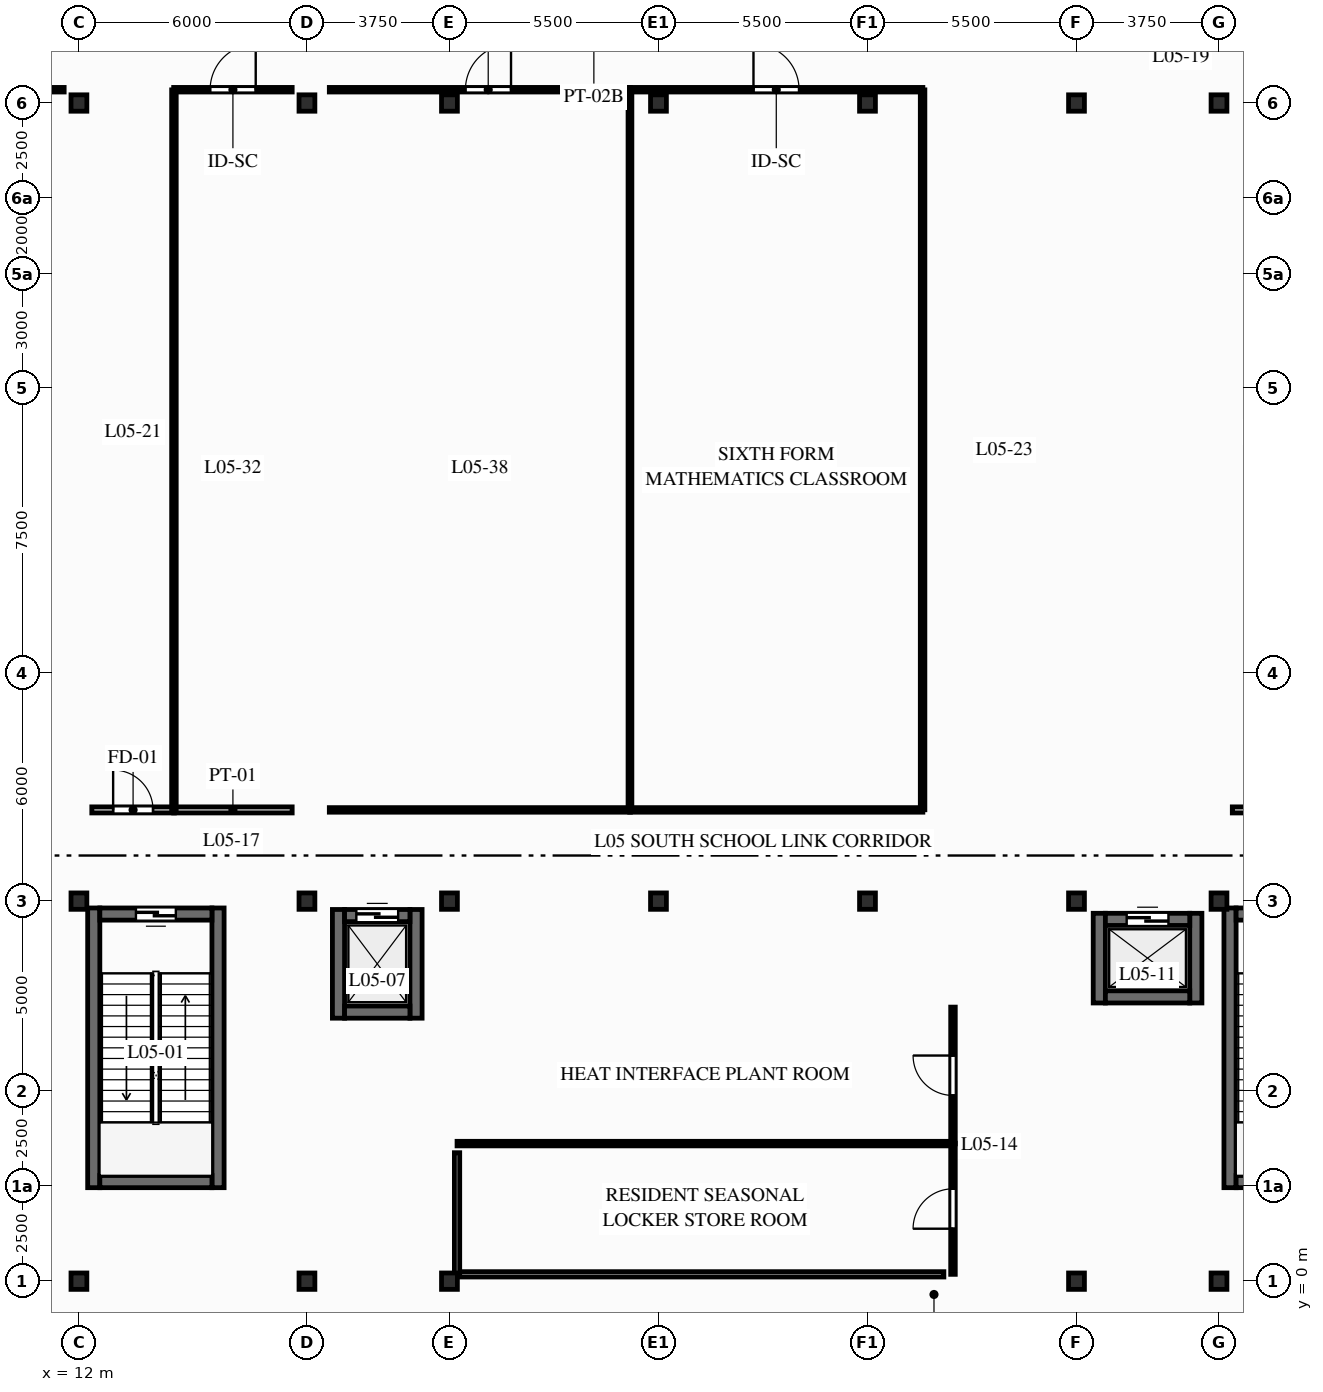
"""IFC4 building model, lengths in metres.
Left out: names, types, materials, properties, quantities, classifications, styles, units other than length and angle.
Written with IfcOpenShell. Run it as: python <this file> out.ifc"""

import sys

from ifc_helpers import new_model, si_unit, direction, frame, frame_2d, origin, origin_2d, place, context, subcontext, project, spatial, rectangle, i_section, extrude, element, fill, save


model = new_model("IFC4")
c1 = context("Model", 3, precision=1e-05, world=origin(), true_north=direction((0.0, 1.0)))
c2 = subcontext(c1, "Body", "Model", "MODEL_VIEW")
j1 = project(units=[si_unit("LENGTHUNIT", "METRE"), si_unit("PLANEANGLEUNIT", "RADIAN")], contexts=[c1])
p1 = place(None, origin())
s1 = spatial("IfcSite", under=j1, at=p1, CompositionType="ELEMENT")
p2 = place(p1, origin())
s2 = spatial("IfcBuilding", under=s1, at=p2, CompositionType="ELEMENT")
p3 = place(p2, frame((0.0, 0.0, 22.5)))
s3 = spatial("IfcBuildingStorey", under=s2, at=p3, CompositionType="ELEMENT", Elevation=22.5)
for number, where, z_axis, x_axis in (
    (1, (12.0, 0.0, 0.0), (0.0, 0.0, 1.0), (1.0, 0.0, 0.0)),
    (2, (12.0, 10.0, 0.0), (0.0, 0.0, 1.0), (1.0, 0.0, 0.0)),
    (3, (12.0, 31.0, 0.0), (0.0, 0.0, 1.0), (1.0, 0.0, 0.0)),
    (4, (18.0, 0.0, 0.0), (0.0, 0.0, 1.0), (1.0, 0.0, 0.0)),
    (5, (18.0, 10.0, 0.0), (0.0, 0.0, 1.0), (1.0, 0.0, 0.0)),
    (6, (18.0, 31.0, 0.0), (0.0, 0.0, 1.0), (1.0, 0.0, 0.0)),
    (7, (21.75, 0.0, 0.0), (0.0, 0.0, 1.0), (1.0, 0.0, 0.0)),
    (8, (21.75, 10.0, 0.0), (0.0, 0.0, 1.0), (1.0, 0.0, 0.0)),
    (9, (21.75, 31.0, 0.0), (0.0, 0.0, 1.0), (1.0, 0.0, 0.0)),
    (10, (27.25, 10.0, 0.0), (0.0, 0.0, 1.0), (1.0, 0.0, 0.0)),
    (11, (27.25, 31.0, 0.0), (0.0, 0.0, 1.0), (1.0, 0.0, 0.0)),
    (12, (32.75, 10.0, 0.0), (0.0, 0.0, 1.0), (1.0, 0.0, 0.0)),
    (13, (32.75, 31.0, 0.0), (0.0, 0.0, 1.0), (1.0, 0.0, 0.0)),
    (14, (38.25, 0.0, 0.0), (0.0, 0.0, 1.0), (1.0, 0.0, 0.0)),
    (15, (38.25, 10.0, 0.0), (0.0, 0.0, 1.0), (1.0, 0.0, 0.0)),
    (16, (38.25, 31.0, 0.0), (0.0, 0.0, 1.0), (1.0, 0.0, 0.0)),
    (17, (42.0, 0.0, 0.0), (0.0, 0.0, 1.0), (1.0, 0.0, 0.0)),
    (18, (42.0, 10.0, 0.0), (0.0, 0.0, 1.0), (1.0, 0.0, 0.0)),
    (19, (42.0, 31.0, 0.0), (0.0, 0.0, 1.0), (1.0, 0.0, 0.0)),
):
    element("IfcColumn", number, at=place(p3, frame(where, z_axis=z_axis, x_axis=x_axis)), inside=s3, PredefinedType="COLUMN", context=c2, shape_type="SweptSolid", body=[
        extrude(i_section(OverallWidth=0.417, OverallDepth=0.431, WebThickness=0.065, FlangeThickness=0.106, FilletRadius=0.015, at=origin_2d()), origin(), (0.0, 0.0, 1.0), 5.5),
    ])
for number, where, z_axis, x_axis in (
    (20, (12.39, 2.46, 0.0), (0.0, 0.0, 1.0), (0.0, 1.0, 0.0)),
    (21, (15.66, 2.46, 0.0), (0.0, 0.0, 1.0), (0.0, 1.0, 0.0)),
):
    element("IfcWall", number, at=place(p3, frame(where, z_axis=z_axis, x_axis=x_axis)), inside=s3, PredefinedType="SHEAR", context=c2, shape_type="SweptSolid", body=[
        extrude(rectangle(XDim=7.36, YDim=0.32, at=frame_2d((3.68, 0.0))), origin(), (0.0, 0.0, 1.0), 5.23),
    ])
p4 = place(p3, frame((12.55, 2.62, 0.0), z_axis=(0.0, 0.0, 1.0), x_axis=(1.0, 0.0, 0.0)))
e22 = element("IfcWall", 22, at=p4, inside=s3, PredefinedType="SHEAR", context=c2, shape_type="SweptSolid", body=[
    extrude(rectangle(XDim=2.95, YDim=0.32, at=frame_2d((1.475, 0.0))), origin(), (0.0, 0.0, 1.0), 5.23),
])
p5 = place(p3, frame((15.5, 9.66, 0.0), z_axis=(0.0, 0.0, 1.0), x_axis=(-1.0, 0.0, 0.0)))
e23 = element("IfcWall", 23, at=p5, inside=s3, PredefinedType="SHEAR", context=c2, shape_type="SweptSolid", body=[
    extrude(rectangle(XDim=2.95, YDim=0.32, at=frame_2d((1.475, 0.0))), origin(), (0.0, 0.0, 1.0), 5.23),
])
p6 = place(p5, frame((0.95, 0.0, 0.0)))
e24 = element("IfcOpeningElement", 24, at=p6, cuts=e23, PredefinedType="OPENING", context=c2, shape_type="SweptSolid", body=[
    extrude(rectangle(XDim=1.05, YDim=2.06, at=frame_2d((0.525, 1.03))), frame((0.0, 0.17, 0.0), z_axis=(0.0, -1.0, 0.0), x_axis=(1.0, 0.0, 0.0)), (0.0, 0.0, 1.0), 0.34),
])
p7 = place(p3, frame((42.29, 2.46, 0.0), z_axis=(0.0, 0.0, 1.0), x_axis=(0.0, 1.0, 0.0)))
e25 = element("IfcWall", 25, at=p7, inside=s3, PredefinedType="SHEAR", context=c2, shape_type="SweptSolid", body=[
    extrude(rectangle(XDim=7.36, YDim=0.32, at=frame_2d((3.68, 0.0))), origin(), (0.0, 0.0, 1.0), 5.23),
])
p8 = place(p3, frame((42.45, 2.62, 0.0), z_axis=(0.0, 0.0, 1.0), x_axis=(1.0, 0.0, 0.0)))
e26 = element("IfcWall", 26, at=p8, inside=s3, PredefinedType="SHEAR", context=c2, shape_type="SweptSolid", body=[
    extrude(rectangle(XDim=2.95, YDim=0.32, at=frame_2d((1.475, 0.0))), origin(), (0.0, 0.0, 1.0), 5.23),
])
p9 = place(p3, frame((45.4, 9.66, 0.0), z_axis=(0.0, 0.0, 1.0), x_axis=(-1.0, 0.0, 0.0)))
e27 = element("IfcWall", 27, at=p9, inside=s3, PredefinedType="SHEAR", context=c2, shape_type="SweptSolid", body=[
    extrude(rectangle(XDim=2.95, YDim=0.32, at=frame_2d((1.475, 0.0))), origin(), (0.0, 0.0, 1.0), 5.23),
])
p10 = place(p9, frame((0.95, 0.0, 0.0)))
e28 = element("IfcOpeningElement", 28, at=p10, cuts=e27, PredefinedType="OPENING", context=c2, shape_type="SweptSolid", body=[
    extrude(rectangle(XDim=1.05, YDim=2.06, at=frame_2d((0.525, 1.03))), frame((0.0, 0.17, 0.0), z_axis=(0.0, -1.0, 0.0), x_axis=(1.0, 0.0, 0.0)), (0.0, 0.0, 1.0), 0.34),
])
for number, where, z_axis, x_axis in (
    (29, (18.83, 6.92, 0.0), (0.0, 0.0, 1.0), (0.0, 1.0, 0.0)),
    (30, (20.87, 6.92, 0.0), (0.0, 0.0, 1.0), (0.0, 1.0, 0.0)),
):
    element("IfcWall", number, at=place(p3, frame(where, z_axis=z_axis, x_axis=x_axis)), inside=s3, PredefinedType="SHEAR", context=c2, shape_type="SweptSolid", body=[
        extrude(rectangle(XDim=2.86, YDim=0.32, at=frame_2d((1.43, 0.0))), origin(), (0.0, 0.0, 1.0), 5.23),
    ])
p11 = place(p3, frame((18.99, 7.08, 0.0), z_axis=(0.0, 0.0, 1.0), x_axis=(1.0, 0.0, 0.0)))
e31 = element("IfcWall", 31, at=p11, inside=s3, PredefinedType="SHEAR", context=c2, shape_type="SweptSolid", body=[
    extrude(rectangle(XDim=1.72, YDim=0.32, at=frame_2d((0.86, 0.0))), origin(), (0.0, 0.0, 1.0), 5.23),
])
p12 = place(p3, frame((18.99, 9.62, 0.0), z_axis=(0.0, 0.0, 1.0), x_axis=(1.0, 0.0, 0.0)))
e32 = element("IfcWall", 32, at=p12, inside=s3, PredefinedType="SHEAR", context=c2, shape_type="SweptSolid", body=[
    extrude(rectangle(XDim=1.72, YDim=0.32, at=frame_2d((0.86, 0.0))), origin(), (0.0, 0.0, 1.0), 5.23),
])
p13 = place(p12, frame((0.31, 0.0, 0.0)))
e33 = element("IfcOpeningElement", 33, at=p13, cuts=e32, PredefinedType="OPENING", context=c2, shape_type="SweptSolid", body=[
    extrude(rectangle(XDim=1.1, YDim=2.06, at=frame_2d((0.55, 1.03))), frame((0.0, 0.17, 0.0), z_axis=(0.0, -1.0, 0.0), x_axis=(1.0, 0.0, 0.0)), (0.0, 0.0, 1.0), 0.34),
])
for number, where, z_axis, x_axis in (
    (34, (38.85, 7.32, 0.0), (0.0, 0.0, 1.0), (0.0, 1.0, 0.0)),
    (35, (41.39, 7.32, 0.0), (0.0, 0.0, 1.0), (0.0, 1.0, 0.0)),
):
    element("IfcWall", number, at=place(p3, frame(where, z_axis=z_axis, x_axis=x_axis)), inside=s3, PredefinedType="SHEAR", context=c2, shape_type="SweptSolid", body=[
        extrude(rectangle(XDim=2.36, YDim=0.32, at=frame_2d((1.18, 0.0))), origin(), (0.0, 0.0, 1.0), 5.23),
    ])
p14 = place(p3, frame((39.01, 7.48, 0.0), z_axis=(0.0, 0.0, 1.0), x_axis=(1.0, 0.0, 0.0)))
e36 = element("IfcWall", 36, at=p14, inside=s3, PredefinedType="SHEAR", context=c2, shape_type="SweptSolid", body=[
    extrude(rectangle(XDim=2.22, YDim=0.32, at=frame_2d((1.11, 0.0))), origin(), (0.0, 0.0, 1.0), 5.23),
])
p15 = place(p3, frame((39.01, 9.52, 0.0), z_axis=(0.0, 0.0, 1.0), x_axis=(1.0, 0.0, 0.0)))
e37 = element("IfcWall", 37, at=p15, inside=s3, PredefinedType="SHEAR", context=c2, shape_type="SweptSolid", body=[
    extrude(rectangle(XDim=2.22, YDim=0.32, at=frame_2d((1.11, 0.0))), origin(), (0.0, 0.0, 1.0), 5.23),
])
p16 = place(p15, frame((0.56, 0.0, 0.0)))
e38 = element("IfcOpeningElement", 38, at=p16, cuts=e37, PredefinedType="OPENING", context=c2, shape_type="SweptSolid", body=[
    extrude(rectangle(XDim=1.1, YDim=2.06, at=frame_2d((0.55, 1.03))), frame((0.0, 0.17, 0.0), z_axis=(0.0, -1.0, 0.0), x_axis=(1.0, 0.0, 0.0)), (0.0, 0.0, 1.0), 0.34),
])
p17 = place(p3, frame((35.0, 0.18, 0.0), z_axis=(0.0, 0.0, 1.0), x_axis=(0.0, 1.0, 0.0)))
e39 = element("IfcWall", 39, at=p17, inside=s3, PredefinedType="PARTITIONING", context=c2, shape_type="SweptSolid", body=[
    extrude(rectangle(XDim=3.451, YDim=0.12, at=frame_2d((1.726, 0.0))), origin(), (0.0, 0.0, 1.0), 5.23),
])
p18 = place(p17, frame((1.201, 0.0, 0.0)))
e40 = element("IfcOpeningElement", 40, at=p18, cuts=e39, PredefinedType="OPENING", context=c2, shape_type="SweptSolid", body=[
    extrude(rectangle(XDim=1.05, YDim=2.06, at=frame_2d((0.525, 1.03))), frame((0.0, 0.07, 0.0), z_axis=(0.0, -1.0, 0.0), x_axis=(1.0, 0.0, 0.0)), (0.0, 0.0, 1.0), 0.14),
])
p19 = place(p3, frame((35.0, 3.613, 0.0), z_axis=(0.0, 0.0, 1.0), x_axis=(0.0, 1.0, 0.0)))
e41 = element("IfcWall", 41, at=p19, inside=s3, PredefinedType="PARTITIONING", context=c2, shape_type="SweptSolid", body=[
    extrude(rectangle(XDim=3.598, YDim=0.12, at=frame_2d((1.799, 0.0))), origin(), (0.0, 0.0, 1.0), 5.23),
])
p20 = place(p19, frame((1.274, 0.0, 0.0)))
e42 = element("IfcOpeningElement", 42, at=p20, cuts=e41, PredefinedType="OPENING", context=c2, shape_type="SweptSolid", body=[
    extrude(rectangle(XDim=1.05, YDim=2.06, at=frame_2d((0.525, 1.03))), frame((0.0, 0.07, 0.0), z_axis=(0.0, -1.0, 0.0), x_axis=(1.0, 0.0, 0.0)), (0.0, 0.0, 1.0), 0.14),
])
p21 = place(p3, frame((21.95, 3.62, 0.0), z_axis=(0.0, 0.0, 1.0), x_axis=(1.0, 0.0, 0.0)))
e43 = element("IfcWall", 43, at=p21, inside=s3, PredefinedType="PARTITIONING", context=c2, shape_type="SweptSolid", body=[
    extrude(rectangle(XDim=13.046, YDim=0.12, at=frame_2d((6.523, 0.0))), origin(), (0.0, 0.0, 1.0), 5.23),
])
p22 = place(p3, frame((12.339, 12.4, 0.0), z_axis=(0.0, 0.0, 1.0), x_axis=(1.0, 0.0, 0.0)))
e44 = element("IfcWall", 44, at=p22, inside=s3, PredefinedType="PARTITIONING", context=c2, shape_type="SweptSolid", body=[
    extrude(rectangle(XDim=2.173, YDim=0.16, at=frame_2d((1.086, 0.0))), origin(), (0.0, 0.0, 1.0), 5.23),
])
p23 = place(p22, frame((0.561, 0.0, 0.0)))
e45 = element("IfcOpeningElement", 45, at=p23, cuts=e44, PredefinedType="OPENING", context=c2, shape_type="SweptSolid", body=[
    extrude(rectangle(XDim=1.05, YDim=2.06, at=frame_2d((0.525, 1.03))), frame((0.0, 0.09, 0.0), z_axis=(0.0, -1.0, 0.0), x_axis=(1.0, 0.0, 0.0)), (0.0, 0.0, 1.0), 0.18),
])
p24 = place(p3, frame((14.493, 12.4, 0.0), z_axis=(0.0, 0.0, 1.0), x_axis=(1.0, 0.0, 0.0)))
e46 = element("IfcWall", 46, at=p24, inside=s3, PredefinedType="PARTITIONING", context=c2, shape_type="SweptSolid", body=[
    extrude(rectangle(XDim=3.119, YDim=0.16, at=frame_2d((1.559, 0.0))), origin(), (0.0, 0.0, 1.0), 5.23),
])
p25 = place(p3, frame((42.35, 12.4, 0.0), z_axis=(0.0, 0.0, 1.0), x_axis=(1.0, 0.0, 0.0)))
e47 = element("IfcWall", 47, at=p25, inside=s3, PredefinedType="PARTITIONING", context=c2, shape_type="SweptSolid", body=[
    extrude(rectangle(XDim=2.161, YDim=0.16, at=frame_2d((1.081, 0.0))), origin(), (0.0, 0.0, 1.0), 5.23),
])
p26 = place(p25, frame((0.556, 0.0, 0.0)))
e48 = element("IfcOpeningElement", 48, at=p26, cuts=e47, PredefinedType="OPENING", context=c2, shape_type="SweptSolid", body=[
    extrude(rectangle(XDim=1.05, YDim=2.06, at=frame_2d((0.525, 1.03))), frame((0.0, 0.09, 0.0), z_axis=(0.0, -1.0, 0.0), x_axis=(1.0, 0.0, 0.0)), (0.0, 0.0, 1.0), 0.18),
])
p27 = place(p3, frame((6.389, 31.35, 0.0), z_axis=(0.0, 0.0, 1.0), x_axis=(1.0, 0.0, 0.0)))
e49 = element("IfcWall", 49, at=p27, inside=s3, PredefinedType="PARTITIONING", context=c2, shape_type="SweptSolid", body=[
    extrude(rectangle(XDim=5.223, YDim=0.12, at=frame_2d((2.611, 0.0))), origin(), (0.0, 0.0, 1.0), 5.23),
])
p28 = place(p27, frame((2.011, 0.0, 0.0)))
e50 = element("IfcOpeningElement", 50, at=p28, cuts=e49, PredefinedType="OPENING", context=c2, shape_type="SweptSolid", body=[
    extrude(rectangle(XDim=1.2, YDim=2.08, at=frame_2d((0.6, 1.04))), frame((0.0, 0.07, 0.0), z_axis=(0.0, -1.0, 0.0), x_axis=(1.0, 0.0, 0.0)), (0.0, 0.0, 1.0), 0.14),
])
p29 = place(p3, frame((14.493, 31.35, 0.0), z_axis=(0.0, 0.0, 1.0), x_axis=(1.0, 0.0, 0.0)))
e51 = element("IfcWall", 51, at=p29, inside=s3, PredefinedType="PARTITIONING", context=c2, shape_type="SweptSolid", body=[
    extrude(rectangle(XDim=3.119, YDim=0.12, at=frame_2d((1.559, 0.0))), origin(), (0.0, 0.0, 1.0), 5.23),
])
p30 = place(p29, frame((0.959, 0.0, 0.0)))
e52 = element("IfcOpeningElement", 52, at=p30, cuts=e51, PredefinedType="OPENING", context=c2, shape_type="SweptSolid", body=[
    extrude(rectangle(XDim=1.2, YDim=2.08, at=frame_2d((0.6, 1.04))), frame((0.0, 0.07, 0.0), z_axis=(0.0, -1.0, 0.0), x_axis=(1.0, 0.0, 0.0)), (0.0, 0.0, 1.0), 0.14),
])
p31 = place(p3, frame((18.589, 31.35, 0.0), z_axis=(0.0, 0.0, 1.0), x_axis=(1.0, 0.0, 0.0)))
e53 = element("IfcWall", 53, at=p31, inside=s3, PredefinedType="PARTITIONING", context=c2, shape_type="SweptSolid", body=[
    extrude(rectangle(XDim=7.923, YDim=0.12, at=frame_2d((3.961, 0.0))), origin(), (0.0, 0.0, 1.0), 4.585),
])
p32 = place(p31, frame((3.581, 0.0, 0.0)))
e54 = element("IfcOpeningElement", 54, at=p32, cuts=e53, PredefinedType="OPENING", context=c2, shape_type="SweptSolid", body=[
    extrude(rectangle(XDim=1.2, YDim=2.08, at=frame_2d((0.6, 1.04))), frame((0.0, 0.07, 0.0), z_axis=(0.0, -1.0, 0.0), x_axis=(1.0, 0.0, 0.0)), (0.0, 0.0, 1.0), 0.14),
])
p33 = place(p3, frame((26.493, 31.35, 0.0), z_axis=(0.0, 0.0, 1.0), x_axis=(1.0, 0.0, 0.0)))
e55 = element("IfcWall", 55, at=p33, inside=s3, PredefinedType="PARTITIONING", context=c2, shape_type="SweptSolid", body=[
    extrude(rectangle(XDim=7.715, YDim=0.12, at=frame_2d((3.857, 0.0))), origin(), (0.0, 0.0, 1.0), 5.23),
])
p34 = place(p33, frame((3.257, 0.0, 0.0)))
e56 = element("IfcOpeningElement", 56, at=p34, cuts=e55, PredefinedType="OPENING", context=c2, shape_type="SweptSolid", body=[
    extrude(rectangle(XDim=1.2, YDim=2.08, at=frame_2d((0.6, 1.04))), frame((0.0, 0.07, 0.0), z_axis=(0.0, -1.0, 0.0), x_axis=(1.0, 0.0, 0.0)), (0.0, 0.0, 1.0), 0.14),
])
p35 = place(p3, frame((18.589, 12.4, 0.0), z_axis=(0.0, 0.0, 1.0), x_axis=(1.0, 0.0, 0.0)))
e57 = element("IfcWall", 57, at=p35, inside=s3, PredefinedType="PARTITIONING", context=c2, shape_type="SweptSolid", body=[
    extrude(rectangle(XDim=7.923, YDim=0.12, at=frame_2d((3.961, 0.0))), origin(), (0.0, 0.0, 1.0), 3.405),
])
p36 = place(p3, frame((26.493, 12.4, 0.0), z_axis=(0.0, 0.0, 1.0), x_axis=(1.0, 0.0, 0.0)))
e58 = element("IfcWall", 58, at=p36, inside=s3, PredefinedType="PARTITIONING", context=c2, shape_type="SweptSolid", body=[
    extrude(rectangle(XDim=7.715, YDim=0.12, at=frame_2d((3.857, 0.0))), origin(), (0.0, 0.0, 1.0), 5.23),
])
for number, where, z_axis, x_axis in (
    (59, (14.5, 12.404, 0.0), (0.0, 0.0, 1.0), (0.0, 1.0, 0.0)),
    (60, (34.2, 12.404, 0.0), (0.0, 0.0, 1.0), (0.0, 1.0, 0.0)),
):
    element("IfcWall", number, at=place(p3, frame(where, z_axis=z_axis, x_axis=x_axis)), inside=s3, PredefinedType="PARTITIONING", context=c2, shape_type="SweptSolid", body=[
        extrude(rectangle(XDim=18.942, YDim=0.12, at=frame_2d((9.471, 0.0))), origin(), (0.0, 0.0, 1.0), 4.585),
    ])
p37 = place(p3, frame((26.5, 12.404, 0.0), z_axis=(0.0, 0.0, 1.0), x_axis=(0.0, 1.0, 0.0)))
e61 = element("IfcWall", 61, at=p37, inside=s3, PredefinedType="PARTITIONING", context=c2, shape_type="SweptSolid", body=[
    extrude(rectangle(XDim=18.942, YDim=0.1, at=frame_2d((9.471, 0.0))), origin(), (0.0, 0.0, 1.0), 4.585),
])
p38 = place(p3, frame((21.95, 0.18, 0.0), z_axis=(0.0, 0.0, 1.0), x_axis=(1.0, 0.0, 0.0)))
e62 = element("IfcWall", 62, at=p38, inside=s3, PredefinedType="PARTITIONING", context=c2, shape_type="SweptSolid", body=[
    extrude(rectangle(XDim=12.81, YDim=0.14, at=frame_2d((6.405, 0.0))), origin(), (0.0, 0.0, 1.0), 4.666),
])
p39 = place(p3, frame((21.95, 0.18, 0.0), z_axis=(0.0, 0.0, 1.0), x_axis=(0.0, 1.0, 0.0)))
e63 = element("IfcWall", 63, at=p39, inside=s3, PredefinedType="PARTITIONING", context=c2, shape_type="SweptSolid", body=[
    extrude(rectangle(XDim=3.2, YDim=0.14, at=frame_2d((1.6, 0.0))), origin(), (0.0, 0.0, 1.0), 4.585),
])
p40 = place(p6, origin())
e64 = element("IfcDoor", 64, at=p40, inside=s3, OperationType="SINGLE_SWING_LEFT", PredefinedType="DOOR", context=c2, shape_type="SweptSolid", body=[
    extrude(rectangle(XDim=1.05, YDim=2.06, at=frame_2d((0.525, 1.03))), frame((0.0, 0.025, 0.0), z_axis=(0.0, -1.0, 0.0), x_axis=(1.0, 0.0, 0.0)), (0.0, 0.0, 1.0), 0.05),
])
fill(e24, e64)
p41 = place(p13, origin())
e65 = element("IfcDoor", 65, at=p41, inside=s3, OperationType="SLIDING_TO_LEFT", PredefinedType="DOOR", context=c2, shape_type="SweptSolid", body=[
    extrude(rectangle(XDim=1.1, YDim=2.06, at=frame_2d((0.55, 1.03))), frame((0.0, 0.025, 0.0), z_axis=(0.0, -1.0, 0.0), x_axis=(1.0, 0.0, 0.0)), (0.0, 0.0, 1.0), 0.05),
])
fill(e33, e65)
p42 = place(p16, origin())
e66 = element("IfcDoor", 66, at=p42, inside=s3, OperationType="SLIDING_TO_LEFT", PredefinedType="DOOR", context=c2, shape_type="SweptSolid", body=[
    extrude(rectangle(XDim=1.1, YDim=2.06, at=frame_2d((0.55, 1.03))), frame((0.0, 0.025, 0.0), z_axis=(0.0, -1.0, 0.0), x_axis=(1.0, 0.0, 0.0)), (0.0, 0.0, 1.0), 0.05),
])
fill(e38, e66)
p43 = place(p18, origin())
e67 = element("IfcDoor", 67, at=p43, inside=s3, OperationType="SINGLE_SWING_LEFT", PredefinedType="DOOR", context=c2, shape_type="SweptSolid", body=[
    extrude(rectangle(XDim=1.05, YDim=2.06, at=frame_2d((0.525, 1.03))), frame((0.0, 0.025, 0.0), z_axis=(0.0, -1.0, 0.0), x_axis=(1.0, 0.0, 0.0)), (0.0, 0.0, 1.0), 0.05),
])
fill(e40, e67)
p44 = place(p20, origin())
e68 = element("IfcDoor", 68, at=p44, inside=s3, OperationType="SINGLE_SWING_RIGHT", PredefinedType="DOOR", context=c2, shape_type="SweptSolid", body=[
    extrude(rectangle(XDim=1.05, YDim=2.06, at=frame_2d((0.525, 1.03))), frame((0.0, 0.025, 0.0), z_axis=(0.0, -1.0, 0.0), x_axis=(1.0, 0.0, 0.0)), (0.0, 0.0, 1.0), 0.05),
])
fill(e42, e68)
p45 = place(p23, origin())
e69 = element("IfcDoor", 69, at=p45, inside=s3, OperationType="SINGLE_SWING_LEFT", PredefinedType="DOOR", context=c2, shape_type="SweptSolid", body=[
    extrude(rectangle(XDim=1.05, YDim=2.06, at=frame_2d((0.525, 1.03))), frame((0.0, 0.025, 0.0), z_axis=(0.0, -1.0, 0.0), x_axis=(1.0, 0.0, 0.0)), (0.0, 0.0, 1.0), 0.05),
])
fill(e45, e69)
p46 = place(p30, origin())
e70 = element("IfcDoor", 70, at=p46, inside=s3, OperationType="SINGLE_SWING_RIGHT", PredefinedType="DOOR", context=c2, shape_type="SweptSolid", body=[
    extrude(rectangle(XDim=1.2, YDim=2.08, at=frame_2d((0.6, 1.04))), frame((0.0, 0.025, 0.0), z_axis=(0.0, -1.0, 0.0), x_axis=(1.0, 0.0, 0.0)), (0.0, 0.0, 1.0), 0.05),
])
fill(e52, e70)
p47 = place(p32, origin())
e71 = element("IfcDoor", 71, at=p47, inside=s3, OperationType="SINGLE_SWING_RIGHT", PredefinedType="DOOR", context=c2, shape_type="SweptSolid", body=[
    extrude(rectangle(XDim=1.2, YDim=2.08, at=frame_2d((0.6, 1.04))), frame((0.0, 0.025, 0.0), z_axis=(0.0, -1.0, 0.0), x_axis=(1.0, 0.0, 0.0)), (0.0, 0.0, 1.0), 0.05),
])
fill(e54, e71)
p48 = place(p34, origin())
e72 = element("IfcDoor", 72, at=p48, inside=s3, OperationType="SINGLE_SWING_LEFT", PredefinedType="DOOR", context=c2, shape_type="SweptSolid", body=[
    extrude(rectangle(XDim=1.2, YDim=2.08, at=frame_2d((0.6, 1.04))), frame((0.0, 0.025, 0.0), z_axis=(0.0, -1.0, 0.0), x_axis=(1.0, 0.0, 0.0)), (0.0, 0.0, 1.0), 0.05),
])
fill(e56, e72)
save(model, sys.argv[1])
